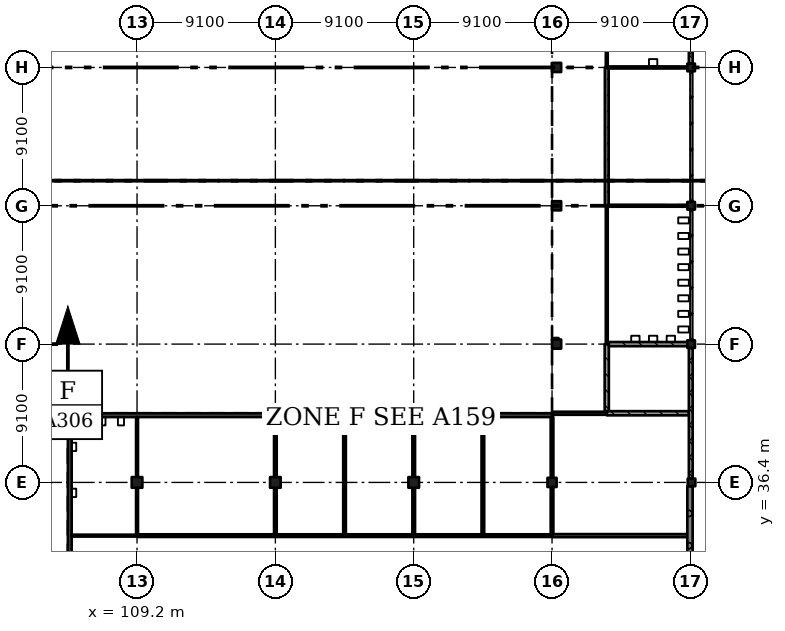
"""IFC4 building model, lengths in metres.
Left out: names, types, materials, properties, quantities, classifications, styles, units other than length and angle.
Written with IfcOpenShell. Run it as: python <this file> out.ifc"""

import sys

from ifc_helpers import new_model, si_unit, direction, frame, frame_2d, origin, origin_2d, place, context, subcontext, project, spatial, rectangle, extrude, element, fill, save


model = new_model("IFC4")
c1 = context("Model", 3, precision=1e-05, world=origin(), true_north=direction((0.0, 1.0)))
c2 = subcontext(c1, "Body", "Model", "MODEL_VIEW")
j1 = project(units=[si_unit("LENGTHUNIT", "METRE"), si_unit("PLANEANGLEUNIT", "RADIAN")], contexts=[c1])
p1 = place(None, origin())
s1 = spatial("IfcSite", under=j1, at=p1, CompositionType="ELEMENT")
p2 = place(p1, origin())
s2 = spatial("IfcBuilding", under=s1, at=p2, CompositionType="ELEMENT")
p3 = place(p2, frame((0.0, 0.0, 20.02)))
s3 = spatial("IfcBuildingStorey", under=s2, at=p3, CompositionType="ELEMENT", Elevation=20.02)
for number, where, z_axis, x_axis in (
    (1, (109.2, 36.4, 0.0), (0.0, 0.0, 1.0), (1.0, 0.0, 0.0)),
    (2, (118.3, 36.4, 0.0), (0.0, 0.0, 1.0), (1.0, 0.0, 0.0)),
    (3, (127.4, 36.4, 0.0), (0.0, 0.0, 1.0), (1.0, 0.0, 0.0)),
):
    element("IfcColumn", number, at=place(p3, frame(where, z_axis=z_axis, x_axis=x_axis)), inside=s3, PredefinedType="COLUMN", context=c2, shape_type="SweptSolid", body=[
        extrude(rectangle(XDim=0.7, YDim=0.7, at=origin_2d()), origin(), (0.0, 0.0, 1.0), 4.55),
    ])
for number, where, z_axis, x_axis in (
    (4, (136.5, 36.4, 0.0), (0.0, 0.0, 1.0), (1.0, 0.0, 0.0)),
    (5, (136.8, 45.5, 0.0), (0.0, 0.0, 1.0), (1.0, 0.0, 0.0)),
    (6, (136.8, 54.6, 0.0), (0.0, 0.0, 1.0), (1.0, 0.0, 0.0)),
    (7, (136.8, 63.7, 0.0), (0.0, 0.0, 1.0), (1.0, 0.0, 0.0)),
):
    element("IfcColumn", number, at=place(p3, frame(where, z_axis=z_axis, x_axis=x_axis)), inside=s3, PredefinedType="COLUMN", context=c2, shape_type="SweptSolid", body=[
        extrude(rectangle(XDim=0.6, YDim=0.6, at=origin_2d()), origin(), (0.0, 0.0, 1.0), 4.55),
    ])
for number, where, z_axis, x_axis in (
    (8, (145.675, 36.4, 0.0), (0.0, 0.0, 1.0), (1.0, 0.0, 0.0)),
    (9, (145.65, 45.5, 0.0), (0.0, 0.0, 1.0), (1.0, 0.0, 0.0)),
    (10, (145.65, 54.6, 0.0), (0.0, 0.0, 1.0), (1.0, 0.0, 0.0)),
    (11, (145.65, 63.7, 0.0), (0.0, 0.0, 1.0), (1.0, 0.0, 0.0)),
):
    element("IfcColumn", number, at=place(p3, frame(where, z_axis=z_axis, x_axis=x_axis)), inside=s3, PredefinedType="COLUMN", context=c2, shape_type="SweptSolid", body=[
        extrude(rectangle(XDim=0.5, YDim=0.5, at=origin_2d()), origin(), (0.0, 0.0, 1.0), 4.55),
    ])
p4 = place(p3, frame((104.775, 40.95, 0.0), z_axis=(0.0, 0.0, 1.0), x_axis=(0.0, -1.0, 0.0)))
e12 = element("IfcWall", 12, at=p4, inside=s3, PredefinedType="SHEAR", context=c2, shape_type="SweptSolid", body=[
    extrude(rectangle(XDim=31.85, YDim=0.25, at=frame_2d((15.925, 0.0))), origin(), (0.0, 0.0, 1.0), 4.55),
])
p5 = place(p3, frame((104.65, 40.825, 0.0), z_axis=(0.0, 0.0, 1.0), x_axis=(1.0, 0.0, 0.0)))
e13 = element("IfcWall", 13, at=p5, inside=s3, PredefinedType="SHEAR", context=c2, shape_type="SweptSolid", body=[
    extrude(rectangle(XDim=31.85, YDim=0.25, at=frame_2d((15.925, 0.0))), origin(), (0.0, 0.0, 1.0), 4.55),
])
p6 = place(p3, frame((145.575, 27.55, 0.0), z_axis=(0.0, 0.0, 1.0), x_axis=(0.0, 1.0, 0.0)))
e14 = element("IfcWall", 14, at=p6, inside=s3, PredefinedType="SOLIDWALL", context=c2, shape_type="SweptSolid", body=[
    extrude(rectangle(XDim=8.6, YDim=0.35, at=frame_2d((4.3, 0.0))), origin(), (0.0, 0.0, 1.0), 3.5),
])
for number, where, z_axis, x_axis in (
    (15, (145.625, 36.65, 0.0), (0.0, 0.0, 1.0), (0.0, 1.0, 0.0)),
    (16, (145.625, 63.95, 0.0), (0.0, 0.0, 1.0), (0.0, 1.0, 0.0)),
):
    element("IfcWall", number, at=place(p3, frame(where, z_axis=z_axis, x_axis=x_axis)), inside=s3, PredefinedType="SOLIDWALL", context=c2, shape_type="SweptSolid", body=[
        extrude(rectangle(XDim=8.6, YDim=0.25, at=frame_2d((4.3, 0.0))), origin(), (0.0, 0.0, 1.0), 3.5),
    ])
p7 = place(p3, frame((109.2, 32.9, 0.0), z_axis=(0.0, 0.0, 1.0), x_axis=(-1.0, 0.0, 0.0)))
e17 = element("IfcWall", 17, at=p7, inside=s3, PredefinedType="PARTITIONING", context=c2, shape_type="SweptSolid", body=[
    extrude(rectangle(XDim=4.3, YDim=0.125, at=frame_2d((2.15, 0.0))), origin(), (0.0, 0.0, 1.0), 4.25),
])
p8 = place(p7, frame((1.65, 0.0, 0.0)))
e18 = element("IfcOpeningElement", 18, at=p8, cuts=e17, PredefinedType="OPENING", context=c2, shape_type="SweptSolid", body=[
    extrude(rectangle(XDim=0.9, YDim=2.1, at=frame_2d((0.45, 1.05))), frame((0.0, 0.073, 0.0), z_axis=(0.0, -1.0, 0.0), x_axis=(1.0, 0.0, 0.0)), (0.0, 0.0, 1.0), 0.145),
])
p9 = place(p3, frame((109.2, 32.988, 0.0), z_axis=(0.0, 0.0, 1.0), x_axis=(0.0, 1.0, 0.0)))
e19 = element("IfcWall", 19, at=p9, inside=s3, PredefinedType="PARTITIONING", context=c2, shape_type="SweptSolid", body=[
    extrude(rectangle(XDim=3.062, YDim=0.125, at=frame_2d((1.531, 0.0))), origin(), (0.0, 0.0, 1.0), 3.5),
])
p10 = place(p3, frame((109.2, 36.75, 0.0), z_axis=(0.0, 0.0, 1.0), x_axis=(0.0, 1.0, 0.0)))
e20 = element("IfcWall", 20, at=p10, inside=s3, PredefinedType="PARTITIONING", context=c2, shape_type="SweptSolid", body=[
    extrude(rectangle(XDim=3.95, YDim=0.125, at=frame_2d((1.975, 0.0))), origin(), (0.0, 0.0, 1.0), 4.25),
])
p11 = place(p3, frame((109.2, 32.9, 0.0), z_axis=(0.0, 0.0, 1.0), x_axis=(1.0, 0.0, 0.0)))
e21 = element("IfcWall", 21, at=p11, inside=s3, PredefinedType="PARTITIONING", context=c2, shape_type="SweptSolid", body=[
    extrude(rectangle(XDim=27.3, YDim=0.175, at=frame_2d((13.65, 0.0))), origin(), (0.0, 0.0, 1.0), 4.25),
])
p12 = place(p11, frame((24.45, 0.0, 0.0)))
e22 = element("IfcOpeningElement", 22, at=p12, cuts=e21, PredefinedType="OPENING", context=c2, shape_type="SweptSolid", body=[
    extrude(rectangle(XDim=1.1, YDim=2.4, at=frame_2d((0.55, 1.2))), frame((0.0, 0.097, 0.0), z_axis=(0.0, -1.0, 0.0), x_axis=(1.0, 0.0, 0.0)), (0.0, 0.0, 1.0), 0.195),
])
p13 = place(p11, frame((19.9, 0.0, 0.0)))
e23 = element("IfcOpeningElement", 23, at=p13, cuts=e21, PredefinedType="OPENING", context=c2, shape_type="SweptSolid", body=[
    extrude(rectangle(XDim=1.1, YDim=2.4, at=frame_2d((0.55, 1.2))), frame((0.0, 0.097, 0.0), z_axis=(0.0, -1.0, 0.0), x_axis=(1.0, 0.0, 0.0)), (0.0, 0.0, 1.0), 0.195),
])
p14 = place(p11, frame((15.35, 0.0, 0.0)))
e24 = element("IfcOpeningElement", 24, at=p14, cuts=e21, PredefinedType="OPENING", context=c2, shape_type="SweptSolid", body=[
    extrude(rectangle(XDim=1.1, YDim=2.4, at=frame_2d((0.55, 1.2))), frame((0.0, 0.097, 0.0), z_axis=(0.0, -1.0, 0.0), x_axis=(1.0, 0.0, 0.0)), (0.0, 0.0, 1.0), 0.195),
])
p15 = place(p11, frame((10.8, 0.0, 0.0)))
e25 = element("IfcOpeningElement", 25, at=p15, cuts=e21, PredefinedType="OPENING", context=c2, shape_type="SweptSolid", body=[
    extrude(rectangle(XDim=1.1, YDim=2.4, at=frame_2d((0.55, 1.2))), frame((0.0, 0.097, 0.0), z_axis=(0.0, -1.0, 0.0), x_axis=(1.0, 0.0, 0.0)), (0.0, 0.0, 1.0), 0.195),
])
p16 = place(p11, frame((4.05, 0.0, 0.0)))
e26 = element("IfcOpeningElement", 26, at=p16, cuts=e21, PredefinedType="OPENING", context=c2, shape_type="SweptSolid", body=[
    extrude(rectangle(XDim=1.1, YDim=2.4, at=frame_2d((0.55, 1.2))), frame((0.0, 0.097, 0.0), z_axis=(0.0, -1.0, 0.0), x_axis=(1.0, 0.0, 0.0)), (0.0, 0.0, 1.0), 0.195),
])
p17 = place(p3, frame((118.3, 32.988, 0.0), z_axis=(0.0, 0.0, 1.0), x_axis=(0.0, 1.0, 0.0)))
e27 = element("IfcWall", 27, at=p17, inside=s3, PredefinedType="PARTITIONING", context=c2, shape_type="SweptSolid", body=[
    extrude(rectangle(XDim=3.062, YDim=0.175, at=frame_2d((1.531, 0.0))), origin(), (0.0, 0.0, 1.0), 3.5),
])
p18 = place(p3, frame((118.3, 36.75, 0.0), z_axis=(0.0, 0.0, 1.0), x_axis=(0.0, 1.0, 0.0)))
e28 = element("IfcWall", 28, at=p18, inside=s3, PredefinedType="PARTITIONING", context=c2, shape_type="SweptSolid", body=[
    extrude(rectangle(XDim=3.95, YDim=0.175, at=frame_2d((1.975, 0.0))), origin(), (0.0, 0.0, 1.0), 4.25),
])
p19 = place(p3, frame((122.85, 32.988, 0.0), z_axis=(0.0, 0.0, 1.0), x_axis=(0.0, 1.0, 0.0)))
e29 = element("IfcWall", 29, at=p19, inside=s3, PredefinedType="PARTITIONING", context=c2, shape_type="SweptSolid", body=[
    extrude(rectangle(XDim=7.712, YDim=0.175, at=frame_2d((3.856, 0.0))), origin(), (0.0, 0.0, 1.0), 4.25),
])
p20 = place(p3, frame((127.4, 32.988, 0.0), z_axis=(0.0, 0.0, 1.0), x_axis=(0.0, 1.0, 0.0)))
e30 = element("IfcWall", 30, at=p20, inside=s3, PredefinedType="PARTITIONING", context=c2, shape_type="SweptSolid", body=[
    extrude(rectangle(XDim=3.062, YDim=0.175, at=frame_2d((1.531, 0.0))), origin(), (0.0, 0.0, 1.0), 3.5),
])
p21 = place(p3, frame((127.4, 36.75, 0.0), z_axis=(0.0, 0.0, 1.0), x_axis=(0.0, 1.0, 0.0)))
e31 = element("IfcWall", 31, at=p21, inside=s3, PredefinedType="PARTITIONING", context=c2, shape_type="SweptSolid", body=[
    extrude(rectangle(XDim=3.95, YDim=0.175, at=frame_2d((1.975, 0.0))), origin(), (0.0, 0.0, 1.0), 4.25),
])
p22 = place(p3, frame((131.95, 32.988, 0.0), z_axis=(0.0, 0.0, 1.0), x_axis=(0.0, 1.0, 0.0)))
e32 = element("IfcWall", 32, at=p22, inside=s3, PredefinedType="PARTITIONING", context=c2, shape_type="SweptSolid", body=[
    extrude(rectangle(XDim=7.712, YDim=0.175, at=frame_2d((3.856, 0.0))), origin(), (0.0, 0.0, 1.0), 4.25),
])
p23 = place(p3, frame((136.5, 32.9, 0.0), z_axis=(0.0, 0.0, 1.0), x_axis=(1.0, 0.0, 0.0)))
e33 = element("IfcWall", 33, at=p23, inside=s3, PredefinedType="PARTITIONING", context=c2, shape_type="SweptSolid", body=[
    extrude(rectangle(XDim=8.9, YDim=0.2, at=frame_2d((4.45, 0.0))), origin(), (0.0, 0.0, 1.0), 4.25),
])
p24 = place(p23, frame((1.05, 0.0, 0.0)))
e34 = element("IfcOpeningElement", 34, at=p24, cuts=e33, PredefinedType="OPENING", context=c2, shape_type="SweptSolid", body=[
    extrude(rectangle(XDim=2.4, YDim=2.4, at=frame_2d((1.2, 1.2))), frame((0.0, 0.11, 0.0), z_axis=(0.0, -1.0, 0.0), x_axis=(1.0, 0.0, 0.0)), (0.0, 0.0, 1.0), 0.22),
])
p25 = place(p23, frame((5.45, 0.0, 0.0)))
e35 = element("IfcOpeningElement", 35, at=p25, cuts=e33, PredefinedType="OPENING", context=c2, shape_type="SweptSolid", body=[
    extrude(rectangle(XDim=2.4, YDim=2.4, at=frame_2d((1.2, 1.2))), frame((0.0, 0.11, 0.0), z_axis=(0.0, -1.0, 0.0), x_axis=(1.0, 0.0, 0.0)), (0.0, 0.0, 1.0), 0.22),
])
p26 = place(p3, frame((136.5, 36.1, 0.0), z_axis=(0.0, 0.0, 1.0), x_axis=(0.0, -1.0, 0.0)))
e36 = element("IfcWall", 36, at=p26, inside=s3, PredefinedType="PARTITIONING", context=c2, shape_type="SweptSolid", body=[
    extrude(rectangle(XDim=3.1, YDim=0.175, at=frame_2d((1.55, 0.0))), origin(), (0.0, 0.0, 1.0), 3.5),
])
p27 = place(p3, frame((136.5, 40.7, 0.0), z_axis=(0.0, 0.0, 1.0), x_axis=(0.0, -1.0, 0.0)))
e37 = element("IfcWall", 37, at=p27, inside=s3, PredefinedType="PARTITIONING", context=c2, shape_type="SweptSolid", body=[
    extrude(rectangle(XDim=4.0, YDim=0.175, at=frame_2d((2.0, 0.0))), origin(), (0.0, 0.0, 1.0), 3.25),
])
p28 = place(p3, frame((136.53, 40.95, 0.0), z_axis=(0.0, 0.0, 1.0), x_axis=(1.0, 0.0, 0.0)))
e38 = element("IfcWall", 38, at=p28, inside=s3, PredefinedType="PARTITIONING", context=c2, shape_type="SweptSolid", body=[
    extrude(rectangle(XDim=3.57, YDim=0.2, at=frame_2d((1.785, 0.0))), origin(), (0.0, 0.0, 1.0), 4.25),
])
p29 = place(p28, frame((0.55, 0.0, 0.0)))
e39 = element("IfcOpeningElement", 39, at=p29, cuts=e38, PredefinedType="OPENING", context=c2, shape_type="SweptSolid", body=[
    extrude(rectangle(XDim=2.4, YDim=2.4, at=frame_2d((1.2, 1.2))), frame((0.0, 0.11, 0.0), z_axis=(0.0, -1.0, 0.0), x_axis=(1.0, 0.0, 0.0)), (0.0, 0.0, 1.0), 0.22),
])
p30 = place(p3, frame((136.925, 45.8, 0.0), z_axis=(0.0, 0.0, 1.0), x_axis=(-1.0, 0.0, 0.0)))
e40 = element("IfcWall", 40, at=p30, inside=s3, PredefinedType="PARTITIONING", context=c2, shape_type="SweptSolid", body=[
    extrude(rectangle(XDim=0.3, YDim=0.2, at=frame_2d((0.15, 0.0))), origin(), (0.0, 0.0, 1.0), 4.25),
])
p31 = place(p3, frame((140.1, 40.95, 0.0), z_axis=(0.0, 0.0, 1.0), x_axis=(1.0, 0.0, 0.0)))
e41 = element("IfcWall", 41, at=p31, inside=s3, PredefinedType="SOLIDWALL", context=c2, shape_type="SweptSolid", body=[
    extrude(rectangle(XDim=5.4, YDim=0.275, at=frame_2d((2.7, 0.0))), origin(), (0.0, 0.0, 1.0), 4.25),
])
p32 = place(p3, frame((140.1, 45.5, 0.0), z_axis=(0.0, 0.0, 1.0), x_axis=(0.0, -1.0, 0.0)))
e42 = element("IfcWall", 42, at=p32, inside=s3, PredefinedType="SOLIDWALL", context=c2, shape_type="SweptSolid", body=[
    extrude(rectangle(XDim=4.413, YDim=0.275, at=frame_2d((2.206, 0.0))), origin(), (0.0, 0.0, 1.0), 4.25),
])
p33 = place(p32, frame((1.65, 0.0, 0.0)))
e43 = element("IfcOpeningElement", 43, at=p33, cuts=e42, PredefinedType="OPENING", context=c2, shape_type="SweptSolid", body=[
    extrude(rectangle(XDim=1.2, YDim=2.4, at=frame_2d((0.6, 1.2))), frame((0.0, 0.147, 0.0), z_axis=(0.0, -1.0, 0.0), x_axis=(1.0, 0.0, 0.0)), (0.0, 0.0, 1.0), 0.295),
])
p34 = place(p3, frame((140.1, 54.6, 0.0), z_axis=(0.0, 0.0, 1.0), x_axis=(0.0, -1.0, 0.0)))
e44 = element("IfcWall", 44, at=p34, inside=s3, PredefinedType="PARTITIONING", context=c2, shape_type="SweptSolid", body=[
    extrude(rectangle(XDim=9.1, YDim=0.125, at=frame_2d((4.55, 0.0))), origin(), (0.0, 0.0, 1.0), 4.25),
])
p35 = place(p34, frame((4.05, 0.0, 0.0)))
e45 = element("IfcOpeningElement", 45, at=p35, cuts=e44, PredefinedType="OPENING", context=c2, shape_type="SweptSolid", body=[
    extrude(rectangle(XDim=0.9, YDim=2.1, at=frame_2d((0.45, 1.05))), frame((0.0, 0.073, 0.0), z_axis=(0.0, -1.0, 0.0), x_axis=(1.0, 0.0, 0.0)), (0.0, 0.0, 1.0), 0.145),
])
p36 = place(p3, frame((140.1, 63.7, 0.0), z_axis=(0.0, 0.0, 1.0), x_axis=(0.0, -1.0, 0.0)))
e46 = element("IfcWall", 46, at=p36, inside=s3, PredefinedType="SOLIDWALL", context=c2, shape_type="SweptSolid", body=[
    extrude(rectangle(XDim=9.1, YDim=0.25, at=frame_2d((4.55, 0.0))), origin(), (0.0, 0.0, 1.0), 4.25),
])
p37 = place(p36, frame((4.05, 0.0, 0.0)))
e47 = element("IfcOpeningElement", 47, at=p37, cuts=e46, PredefinedType="OPENING", context=c2, shape_type="SweptSolid", body=[
    extrude(rectangle(XDim=1.0, YDim=2.1, at=frame_2d((0.5, 1.05))), frame((0.0, 0.135, 0.0), z_axis=(0.0, -1.0, 0.0), x_axis=(1.0, 0.0, 0.0)), (0.0, 0.0, 1.0), 0.27),
])
p38 = place(p3, frame((140.1, 68.15, 0.0), z_axis=(0.0, 0.0, 1.0), x_axis=(0.0, -1.0, 0.0)))
e48 = element("IfcWall", 48, at=p38, inside=s3, PredefinedType="PARTITIONING", context=c2, shape_type="SweptSolid", body=[
    extrude(rectangle(XDim=4.45, YDim=0.125, at=frame_2d((2.225, 0.0))), origin(), (0.0, 0.0, 1.0), 4.25),
])
p39 = place(p38, frame((1.75, 0.0, 0.0)))
e49 = element("IfcOpeningElement", 49, at=p39, cuts=e48, PredefinedType="OPENING", context=c2, shape_type="SweptSolid", body=[
    extrude(rectangle(XDim=1.0, YDim=2.1, at=frame_2d((0.5, 1.05))), frame((0.0, 0.073, 0.0), z_axis=(0.0, -1.0, 0.0), x_axis=(1.0, 0.0, 0.0)), (0.0, 0.0, 1.0), 0.145),
])
for number, where, z_axis, x_axis in (
    (50, (140.225, 54.6, 0.0), (0.0, 0.0, 1.0), (1.0, 0.0, 0.0)),
    (51, (140.225, 63.7, 0.0), (0.0, 0.0, 1.0), (1.0, 0.0, 0.0)),
):
    element("IfcWall", number, at=place(p3, frame(where, z_axis=z_axis, x_axis=x_axis)), inside=s3, PredefinedType="PARTITIONING", context=c2, shape_type="SweptSolid", body=[
        extrude(rectangle(XDim=5.175, YDim=0.125, at=frame_2d((2.587, 0.0))), origin(), (0.0, 0.0, 1.0), 3.55),
    ])
p40 = place(p3, frame((140.238, 45.5, 0.0), z_axis=(0.0, 0.0, 1.0), x_axis=(1.0, 0.0, 0.0)))
e52 = element("IfcWall", 52, at=p40, inside=s3, PredefinedType="SOLIDWALL", context=c2, shape_type="SweptSolid", body=[
    extrude(rectangle(XDim=5.162, YDim=0.275, at=frame_2d((2.581, 0.0))), origin(), (0.0, 0.0, 1.0), 3.55),
])
p41 = place(p12, origin())
e53 = element("IfcDoor", 53, at=p41, inside=s3, OperationType="SINGLE_SWING_RIGHT", PredefinedType="DOOR", context=c2, shape_type="SweptSolid", body=[
    extrude(rectangle(XDim=1.1, YDim=2.4, at=frame_2d((0.55, 1.2))), frame((0.0, 0.025, 0.0), z_axis=(0.0, -1.0, 0.0), x_axis=(1.0, 0.0, 0.0)), (0.0, 0.0, 1.0), 0.05),
])
fill(e22, e53)
p42 = place(p13, origin())
e54 = element("IfcDoor", 54, at=p42, inside=s3, OperationType="SINGLE_SWING_RIGHT", PredefinedType="DOOR", context=c2, shape_type="SweptSolid", body=[
    extrude(rectangle(XDim=1.1, YDim=2.4, at=frame_2d((0.55, 1.2))), frame((0.0, 0.025, 0.0), z_axis=(0.0, -1.0, 0.0), x_axis=(1.0, 0.0, 0.0)), (0.0, 0.0, 1.0), 0.05),
])
fill(e23, e54)
p43 = place(p14, origin())
e55 = element("IfcDoor", 55, at=p43, inside=s3, OperationType="SINGLE_SWING_RIGHT", PredefinedType="DOOR", context=c2, shape_type="SweptSolid", body=[
    extrude(rectangle(XDim=1.1, YDim=2.4, at=frame_2d((0.55, 1.2))), frame((0.0, 0.025, 0.0), z_axis=(0.0, -1.0, 0.0), x_axis=(1.0, 0.0, 0.0)), (0.0, 0.0, 1.0), 0.05),
])
fill(e24, e55)
p44 = place(p15, origin())
e56 = element("IfcDoor", 56, at=p44, inside=s3, OperationType="SINGLE_SWING_RIGHT", PredefinedType="DOOR", context=c2, shape_type="SweptSolid", body=[
    extrude(rectangle(XDim=1.1, YDim=2.4, at=frame_2d((0.55, 1.2))), frame((0.0, 0.025, 0.0), z_axis=(0.0, -1.0, 0.0), x_axis=(1.0, 0.0, 0.0)), (0.0, 0.0, 1.0), 0.05),
])
fill(e25, e56)
p45 = place(p16, origin())
e57 = element("IfcDoor", 57, at=p45, inside=s3, OperationType="SINGLE_SWING_LEFT", PredefinedType="DOOR", context=c2, shape_type="SweptSolid", body=[
    extrude(rectangle(XDim=1.1, YDim=2.4, at=frame_2d((0.55, 1.2))), frame((0.0, 0.025, 0.0), z_axis=(0.0, -1.0, 0.0), x_axis=(1.0, 0.0, 0.0)), (0.0, 0.0, 1.0), 0.05),
])
fill(e26, e57)
p46 = place(p8, origin())
e58 = element("IfcDoor", 58, at=p46, inside=s3, OperationType="SINGLE_SWING_LEFT", PredefinedType="DOOR", context=c2, shape_type="SweptSolid", body=[
    extrude(rectangle(XDim=0.9, YDim=2.1, at=frame_2d((0.45, 1.05))), frame((0.0, 0.025, 0.0), z_axis=(0.0, -1.0, 0.0), x_axis=(1.0, 0.0, 0.0)), (0.0, 0.0, 1.0), 0.05),
])
fill(e18, e58)
p47 = place(p33, origin())
e59 = element("IfcDoor", 59, at=p47, inside=s3, OperationType="SINGLE_SWING_LEFT", PredefinedType="DOOR", context=c2, shape_type="SweptSolid", body=[
    extrude(rectangle(XDim=1.2, YDim=2.4, at=frame_2d((0.6, 1.2))), frame((0.0, 0.025, 0.0), z_axis=(0.0, -1.0, 0.0), x_axis=(1.0, 0.0, 0.0)), (0.0, 0.0, 1.0), 0.05),
])
fill(e43, e59)
p48 = place(p35, origin())
e60 = element("IfcDoor", 60, at=p48, inside=s3, OperationType="SINGLE_SWING_RIGHT", PredefinedType="DOOR", context=c2, shape_type="SweptSolid", body=[
    extrude(rectangle(XDim=0.9, YDim=2.1, at=frame_2d((0.45, 1.05))), frame((0.0, 0.025, 0.0), z_axis=(0.0, -1.0, 0.0), x_axis=(1.0, 0.0, 0.0)), (0.0, 0.0, 1.0), 0.05),
])
fill(e45, e60)
p49 = place(p37, origin())
e61 = element("IfcDoor", 61, at=p49, inside=s3, OperationType="SINGLE_SWING_RIGHT", PredefinedType="DOOR", context=c2, shape_type="SweptSolid", body=[
    extrude(rectangle(XDim=1.0, YDim=2.1, at=frame_2d((0.5, 1.05))), frame((0.0, 0.025, 0.0), z_axis=(0.0, -1.0, 0.0), x_axis=(1.0, 0.0, 0.0)), (0.0, 0.0, 1.0), 0.05),
])
fill(e47, e61)
p50 = place(p24, origin())
e62 = element("IfcDoor", 62, at=p50, inside=s3, OperationType="DOUBLE_DOOR_SINGLE_SWING", PredefinedType="DOOR", context=c2, shape_type="SweptSolid", body=[
    extrude(rectangle(XDim=2.4, YDim=2.4, at=frame_2d((1.2, 1.2))), frame((0.0, 0.025, 0.0), z_axis=(0.0, -1.0, 0.0), x_axis=(1.0, 0.0, 0.0)), (0.0, 0.0, 1.0), 0.05),
])
fill(e34, e62)
p51 = place(p25, origin())
e63 = element("IfcDoor", 63, at=p51, inside=s3, OperationType="DOUBLE_DOOR_SINGLE_SWING", PredefinedType="DOOR", context=c2, shape_type="SweptSolid", body=[
    extrude(rectangle(XDim=2.4, YDim=2.4, at=frame_2d((1.2, 1.2))), frame((0.0, 0.025, 0.0), z_axis=(0.0, -1.0, 0.0), x_axis=(1.0, 0.0, 0.0)), (0.0, 0.0, 1.0), 0.05),
])
fill(e35, e63)
p52 = place(p29, origin())
e64 = element("IfcDoor", 64, at=p52, inside=s3, OperationType="DOUBLE_DOOR_SINGLE_SWING", PredefinedType="DOOR", context=c2, shape_type="SweptSolid", body=[
    extrude(rectangle(XDim=2.4, YDim=2.4, at=frame_2d((1.2, 1.2))), frame((0.0, 0.025, 0.0), z_axis=(0.0, -1.0, 0.0), x_axis=(1.0, 0.0, 0.0)), (0.0, 0.0, 1.0), 0.05),
])
fill(e39, e64)
save(model, sys.argv[1])
